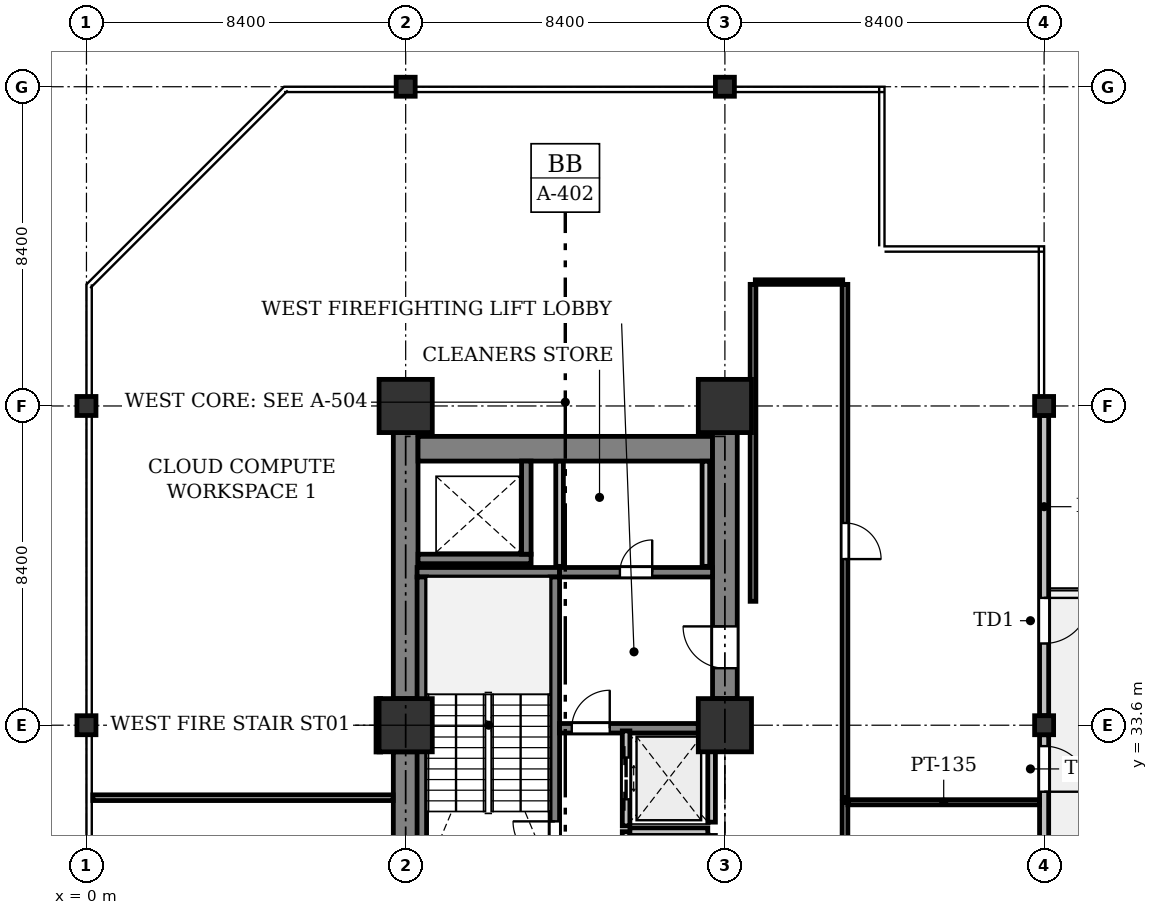
"""IFC4 building model, lengths in metres.
Left out: names, types, materials, properties, quantities, classifications, styles, units other than length and angle.
Written with IfcOpenShell. Run it as: python <this file> out.ifc"""

import sys

from ifc_helpers import new_model, si_unit, direction, frame, frame_2d, origin, origin_2d, place, context, subcontext, project, spatial, rectangle, i_section, extrude, element, fill, save


model = new_model("IFC4")
c1 = context("Model", 3, precision=1e-05, world=origin(), true_north=direction((0.0, 1.0)))
c2 = subcontext(c1, "Body", "Model", "MODEL_VIEW")
j1 = project(units=[si_unit("LENGTHUNIT", "METRE"), si_unit("PLANEANGLEUNIT", "RADIAN")], contexts=[c1])
p1 = place(None, origin())
s1 = spatial("IfcSite", under=j1, at=p1, CompositionType="ELEMENT")
p2 = place(p1, origin())
s2 = spatial("IfcBuilding", under=s1, at=p2, CompositionType="ELEMENT")
p3 = place(p2, frame((0.0, 0.0, 24.8)))
s3 = spatial("IfcBuildingStorey", under=s2, at=p3, CompositionType="ELEMENT", Elevation=24.8)
for number, where, z_axis, x_axis in (
    (1, (0.0, 33.6, 0.0), (0.0, 0.0, 1.0), (1.0, 0.0, 0.0)),
    (2, (0.0, 42.0, 0.0), (0.0, 0.0, 1.0), (1.0, 0.0, 0.0)),
):
    element("IfcColumn", number, at=place(p3, frame(where, z_axis=z_axis, x_axis=x_axis)), inside=s3, PredefinedType="COLUMN", context=c2, shape_type="SweptSolid", body=[
        extrude(i_section(OverallWidth=0.5, OverallDepth=0.5, WebThickness=0.028, FlangeThickness=0.04, at=origin_2d()), origin(), (0.0, 0.0, 1.0), 4.2),
    ])
for number, where, z_axis, x_axis in (
    (3, (8.4, 33.6, 0.0), (0.0, 0.0, 1.0), (1.0, 0.0, 0.0)),
    (4, (8.4, 42.0, 0.0), (0.0, 0.0, 1.0), (1.0, 0.0, 0.0)),
):
    element("IfcColumn", number, at=place(p3, frame(where, z_axis=z_axis, x_axis=x_axis)), inside=s3, PredefinedType="COLUMN", context=c2, shape_type="SweptSolid", body=[
        extrude(rectangle(XDim=1.4, YDim=1.4, at=origin_2d()), origin(), (0.0, 0.0, 1.0), 4.2),
    ])
p4 = place(p3, frame((8.4, 50.4, 0.0), z_axis=(0.0, 0.0, 1.0), x_axis=(1.0, 0.0, 0.0)))
e5 = element("IfcColumn", 5, at=p4, inside=s3, PredefinedType="COLUMN", context=c2, shape_type="SweptSolid", body=[
    extrude(i_section(OverallWidth=0.5, OverallDepth=0.5, WebThickness=0.028, FlangeThickness=0.04, at=origin_2d()), origin(), (0.0, 0.0, 1.0), 4.2),
])
for number, where, z_axis, x_axis in (
    (6, (16.8, 33.6, 0.0), (0.0, 0.0, 1.0), (1.0, 0.0, 0.0)),
    (7, (16.8, 42.0, 0.0), (0.0, 0.0, 1.0), (1.0, 0.0, 0.0)),
):
    element("IfcColumn", number, at=place(p3, frame(where, z_axis=z_axis, x_axis=x_axis)), inside=s3, PredefinedType="COLUMN", context=c2, shape_type="SweptSolid", body=[
        extrude(rectangle(XDim=1.4, YDim=1.4, at=origin_2d()), origin(), (0.0, 0.0, 1.0), 4.2),
    ])
for number, where, z_axis, x_axis in (
    (8, (16.8, 50.4, 0.0), (0.0, 0.0, 1.0), (1.0, 0.0, 0.0)),
    (9, (25.2, 33.6, 0.0), (0.0, 0.0, 1.0), (1.0, 0.0, 0.0)),
    (10, (25.2, 42.0, 0.0), (0.0, 0.0, 1.0), (1.0, 0.0, 0.0)),
):
    element("IfcColumn", number, at=place(p3, frame(where, z_axis=z_axis, x_axis=x_axis)), inside=s3, PredefinedType="COLUMN", context=c2, shape_type="SweptSolid", body=[
        extrude(i_section(OverallWidth=0.5, OverallDepth=0.5, WebThickness=0.028, FlangeThickness=0.04, at=origin_2d()), origin(), (0.0, 0.0, 1.0), 4.2),
    ])
p5 = place(p3, frame((25.2, 41.75, 0.0), z_axis=(0.0, 0.0, 1.0), x_axis=(0.0, -1.0, 0.0)))
e11 = element("IfcWall", 11, at=p5, inside=s3, PredefinedType="STANDARD", context=c2, shape_type="SweptSolid", body=[
    extrude(rectangle(XDim=7.9, YDim=0.24, at=frame_2d((3.95, 0.0))), origin(), (0.0, 0.0, 1.0), 3.471),
])
p6 = place(p5, frame((4.8, 0.0, 0.0)))
e12 = element("IfcOpeningElement", 12, at=p6, cuts=e11, PredefinedType="OPENING", context=c2, shape_type="SweptSolid", body=[
    extrude(rectangle(XDim=1.2, YDim=2.2, at=frame_2d((0.6, 1.1))), frame((0.0, 0.13, 0.0), z_axis=(0.0, -1.0, 0.0), x_axis=(1.0, 0.0, 0.0)), (0.0, 0.0, 1.0), 0.26),
])
p7 = place(p3, frame((25.2, 33.35, 0.0), z_axis=(0.0, 0.0, 1.0), x_axis=(0.0, -1.0, 0.0)))
e13 = element("IfcWall", 13, at=p7, inside=s3, PredefinedType="STANDARD", context=c2, shape_type="SweptSolid", body=[
    extrude(rectangle(XDim=7.9, YDim=0.24, at=frame_2d((3.95, 0.0))), origin(), (0.0, 0.0, 1.0), 3.471),
])
p8 = place(p7, frame((0.3, 0.0, 0.0)))
e14 = element("IfcOpeningElement", 14, at=p8, cuts=e13, PredefinedType="OPENING", context=c2, shape_type="SweptSolid", body=[
    extrude(rectangle(XDim=1.2, YDim=2.2, at=frame_2d((0.6, 1.1))), frame((0.0, 0.13, 0.0), z_axis=(0.0, -1.0, 0.0), x_axis=(1.0, 0.0, 0.0)), (0.0, 0.0, 1.0), 0.26),
])
p9 = place(p7, frame((3.894, 0.0, 0.9)))
e15 = element("IfcOpeningElement", 15, at=p9, cuts=e13, PredefinedType="OPENING", context=c2, shape_type="SweptSolid", body=[
    extrude(rectangle(XDim=1.8, YDim=1.6, at=frame_2d((0.9, 0.8))), frame((0.0, 0.13, 0.0), z_axis=(0.0, -1.0, 0.0), x_axis=(1.0, 0.0, 0.0)), (0.0, 0.0, 1.0), 0.26),
])
for number, where, z_axis, x_axis in (
    (16, (8.4, 25.9, 0.0), (0.0, 0.0, 1.0), (0.0, 1.0, 0.0)),
    (17, (8.4, 34.3, 0.0), (0.0, 0.0, 1.0), (0.0, 1.0, 0.0)),
):
    element("IfcWall", number, at=place(p3, frame(where, z_axis=z_axis, x_axis=x_axis)), inside=s3, PredefinedType="SHEAR", context=c2, shape_type="SweptSolid", body=[
        extrude(rectangle(XDim=7.0, YDim=0.65, at=frame_2d((3.5, 0.0))), origin(), (0.0, 0.0, 1.0), 3.925),
    ])
p10 = place(p3, frame((8.725, 40.875, 0.0), z_axis=(0.0, 0.0, 1.0), x_axis=(1.0, 0.0, 0.0)))
e18 = element("IfcWall", 18, at=p10, inside=s3, PredefinedType="SHEAR", context=c2, shape_type="SweptSolid", body=[
    extrude(rectangle(XDim=7.75, YDim=0.65, at=frame_2d((3.875, 0.0))), origin(), (0.0, 0.0, 1.0), 3.925),
])
p11 = place(p3, frame((16.8, 34.3, 0.0), z_axis=(0.0, 0.0, 1.0), x_axis=(0.0, 1.0, 0.0)))
e19 = element("IfcWall", 19, at=p11, inside=s3, PredefinedType="SHEAR", context=c2, shape_type="SweptSolid", body=[
    extrude(rectangle(XDim=7.0, YDim=0.65, at=frame_2d((3.5, 0.0))), origin(), (0.0, 0.0, 1.0), 3.925),
])
p12 = place(p11, frame((0.8, 0.0, 0.0)))
e20 = element("IfcOpeningElement", 20, at=p12, cuts=e19, PredefinedType="OPENING", context=c2, shape_type="SweptSolid", body=[
    extrude(rectangle(XDim=1.1, YDim=2.15, at=frame_2d((0.55, 1.075))), frame((0.0, 0.335, 0.0), z_axis=(0.0, -1.0, 0.0), x_axis=(1.0, 0.0, 0.0)), (0.0, 0.0, 1.0), 0.67),
])
p13 = place(p3, frame((12.45, 37.625, 0.0), z_axis=(0.0, 0.0, 1.0), x_axis=(-1.0, 0.0, 0.0)))
e21 = element("IfcWall", 21, at=p13, inside=s3, PredefinedType="SHEAR", context=c2, shape_type="SweptSolid", body=[
    extrude(rectangle(XDim=3.75, YDim=0.25, at=frame_2d((1.875, 0.0))), origin(), (0.0, 0.0, 1.0), 3.925),
])
p14 = place(p3, frame((12.325, 29.75, 0.0), z_axis=(0.0, 0.0, 1.0), x_axis=(0.0, 1.0, 0.0)))
e22 = element("IfcWall", 22, at=p14, inside=s3, PredefinedType="SHEAR", context=c2, shape_type="SweptSolid", body=[
    extrude(rectangle(XDim=7.75, YDim=0.25, at=frame_2d((3.875, 0.0))), origin(), (0.0, 0.0, 1.0), 3.925),
])
p15 = place(p14, frame((0.22, 0.0, 0.0)))
e23 = element("IfcOpeningElement", 23, at=p15, cuts=e22, PredefinedType="OPENING", context=c2, shape_type="SweptSolid", body=[
    extrude(rectangle(XDim=1.1, YDim=2.15, at=frame_2d((0.55, 1.075))), frame((0.0, 0.135, 0.0), z_axis=(0.0, -1.0, 0.0), x_axis=(1.0, 0.0, 0.0)), (0.0, 0.0, 1.0), 0.27),
])
p16 = place(p3, frame((8.825, 29.75, 0.0), z_axis=(0.0, 0.0, 1.0), x_axis=(0.0, 1.0, 0.0)))
e24 = element("IfcWall", 24, at=p16, inside=s3, PredefinedType="SHEAR", context=c2, shape_type="SweptSolid", body=[
    extrude(rectangle(XDim=7.75, YDim=0.25, at=frame_2d((3.875, 0.0))), origin(), (0.0, 0.0, 1.0), 3.925),
])
p17 = place(p3, frame((8.725, 37.975, 0.0), z_axis=(0.0, 0.0, 1.0), x_axis=(1.0, 0.0, 0.0)))
e25 = element("IfcWall", 25, at=p17, inside=s3, PredefinedType="SHEAR", context=c2, shape_type="SweptSolid", body=[
    extrude(rectangle(XDim=2.975, YDim=0.25, at=frame_2d((1.487, 0.0))), origin(), (0.0, 0.0, 1.0), 3.925),
])
p18 = place(p3, frame((11.575, 38.1, 0.0), z_axis=(0.0, 0.0, 1.0), x_axis=(0.0, 1.0, 0.0)))
e26 = element("IfcWall", 26, at=p18, inside=s3, PredefinedType="SHEAR", context=c2, shape_type="SweptSolid", body=[
    extrude(rectangle(XDim=2.45, YDim=0.25, at=frame_2d((1.225, 0.0))), origin(), (0.0, 0.0, 1.0), 3.925),
])
p19 = place(p3, frame((12.45, 33.52, 0.0), z_axis=(0.0, 0.0, 1.0), x_axis=(1.0, 0.0, 0.0)))
e27 = element("IfcWall", 27, at=p19, inside=s3, PredefinedType="SHEAR", context=c2, shape_type="SweptSolid", body=[
    extrude(rectangle(XDim=3.65, YDim=0.25, at=frame_2d((1.825, 0.0))), origin(), (0.0, 0.0, 1.0), 3.925),
])
p20 = place(p19, frame((0.32, 0.0, 0.0)))
e28 = element("IfcOpeningElement", 28, at=p20, cuts=e27, PredefinedType="OPENING", context=c2, shape_type="SweptSolid", body=[
    extrude(rectangle(XDim=1.0, YDim=2.15, at=frame_2d((0.5, 1.075))), frame((0.0, 0.135, 0.0), z_axis=(0.0, -1.0, 0.0), x_axis=(1.0, 0.0, 0.0)), (0.0, 0.0, 1.0), 0.27),
])
p21 = place(p3, frame((12.45, 37.625, 0.0), z_axis=(0.0, 0.0, 1.0), x_axis=(1.0, 0.0, 0.0)))
e29 = element("IfcWall", 29, at=p21, inside=s3, PredefinedType="SHEAR", context=c2, shape_type="SweptSolid", body=[
    extrude(rectangle(XDim=4.025, YDim=0.25, at=frame_2d((2.013, 0.0))), origin(), (0.0, 0.0, 1.0), 3.925),
])
p22 = place(p21, frame((1.587, 0.0, 0.0)))
e30 = element("IfcOpeningElement", 30, at=p22, cuts=e29, PredefinedType="OPENING", context=c2, shape_type="SweptSolid", body=[
    extrude(rectangle(XDim=0.85, YDim=2.15, at=frame_2d((0.425, 1.075))), frame((0.0, 0.135, 0.0), z_axis=(0.0, -1.0, 0.0), x_axis=(1.0, 0.0, 0.0)), (0.0, 0.0, 1.0), 0.27),
])
p23 = place(p3, frame((14.2, 28.3, 0.0), z_axis=(0.0, 0.0, 1.0), x_axis=(0.0, 1.0, 0.0)))
e31 = element("IfcWall", 31, at=p23, inside=s3, PredefinedType="PARTITIONING", context=c2, shape_type="SweptSolid", body=[
    extrude(rectangle(XDim=2.5, YDim=0.2, at=frame_2d((1.25, 0.0))), origin(), (0.0, 0.0, 1.0), 3.925),
])
p24 = place(p23, frame((0.7, 0.0, 0.0)))
e32 = element("IfcOpeningElement", 32, at=p24, cuts=e31, PredefinedType="OPENING", context=c2, shape_type="SweptSolid", body=[
    extrude(rectangle(XDim=1.1, YDim=2.2, at=frame_2d((0.55, 1.1))), frame((0.0, 0.11, 0.0), z_axis=(0.0, -1.0, 0.0), x_axis=(1.0, 0.0, 0.0)), (0.0, 0.0, 1.0), 0.22),
])
p25 = place(p3, frame((16.45, 28.4, 0.0), z_axis=(0.0, 0.0, 1.0), x_axis=(0.0, 1.0, 0.0)))
e33 = element("IfcWall", 33, at=p25, inside=s3, PredefinedType="PARTITIONING", context=c2, shape_type="SweptSolid", body=[
    extrude(rectangle(XDim=2.3, YDim=0.2, at=frame_2d((1.15, 0.0))), origin(), (0.0, 0.0, 1.0), 3.925),
])
p26 = place(p3, frame((14.3, 30.8, 0.0), z_axis=(0.0, 0.0, 1.0), x_axis=(1.0, 0.0, 0.0)))
e34 = element("IfcWall", 34, at=p26, inside=s3, PredefinedType="PARTITIONING", context=c2, shape_type="SweptSolid", body=[
    extrude(rectangle(XDim=2.05, YDim=0.2, at=frame_2d((1.025, 0.0))), origin(), (0.0, 0.0, 1.0), 3.925),
])
p27 = place(p3, frame((14.2, 30.95, 0.0), z_axis=(0.0, 0.0, 1.0), x_axis=(0.0, 1.0, 0.0)))
e35 = element("IfcWall", 35, at=p27, inside=s3, PredefinedType="PARTITIONING", context=c2, shape_type="SweptSolid", body=[
    extrude(rectangle(XDim=2.5, YDim=0.2, at=frame_2d((1.25, 0.0))), origin(), (0.0, 0.0, 1.0), 3.925),
])
p28 = place(p27, frame((0.7, 0.0, 0.0)))
e36 = element("IfcOpeningElement", 36, at=p28, cuts=e35, PredefinedType="OPENING", context=c2, shape_type="SweptSolid", body=[
    extrude(rectangle(XDim=1.1, YDim=2.2, at=frame_2d((0.55, 1.1))), frame((0.0, 0.11, 0.0), z_axis=(0.0, -1.0, 0.0), x_axis=(1.0, 0.0, 0.0)), (0.0, 0.0, 1.0), 0.22),
])
p29 = place(p3, frame((16.45, 31.05, 0.0), z_axis=(0.0, 0.0, 1.0), x_axis=(0.0, 1.0, 0.0)))
e37 = element("IfcWall", 37, at=p29, inside=s3, PredefinedType="PARTITIONING", context=c2, shape_type="SweptSolid", body=[
    extrude(rectangle(XDim=2.3, YDim=0.2, at=frame_2d((1.15, 0.0))), origin(), (0.0, 0.0, 1.0), 3.925),
])
for number, where, z_axis, x_axis in (
    (38, (16.3, 37.78, 0.0), (0.0, 0.0, 1.0), (0.0, 1.0, 0.0)),
    (39, (12.45, 40.546, 0.0), (0.0, 0.0, 1.0), (0.0, -1.0, 0.0)),
):
    element("IfcWall", number, at=place(p3, frame(where, z_axis=z_axis, x_axis=x_axis)), inside=s3, PredefinedType="PARTITIONING", context=c2, shape_type="SweptSolid", body=[
        extrude(rectangle(XDim=2.766, YDim=0.2, at=frame_2d((1.383, 0.0))), origin(), (0.0, 0.0, 1.0), 2.825),
    ])
p30 = place(p3, frame((19.96, 31.573, 0.0), z_axis=(0.0, 0.0, 1.0), x_axis=(0.0, -1.0, 0.0)))
e40 = element("IfcWall", 40, at=p30, inside=s3, PredefinedType="PARTITIONING", context=c2, shape_type="SweptSolid", body=[
    extrude(rectangle(XDim=11.613, YDim=0.15, at=frame_2d((5.806, 0.0))), origin(), (0.0, 0.0, 1.0), 3.313),
])
p31 = place(p3, frame((25.076, 31.573, 0.0), z_axis=(0.0, 0.0, 1.0), x_axis=(-1.0, 0.0, 0.0)))
e41 = element("IfcWall", 41, at=p31, inside=s3, PredefinedType="PARTITIONING", context=c2, shape_type="SweptSolid", body=[
    extrude(rectangle(XDim=5.037, YDim=0.135, at=frame_2d((2.519, 0.0))), origin(), (0.0, 0.0, 1.0), 3.566),
])
p32 = place(p3, frame((19.96, 45.2, 0.0), z_axis=(0.0, 0.0, 1.0), x_axis=(0.0, -1.0, 0.0)))
e42 = element("IfcWall", 42, at=p32, inside=s3, PredefinedType="PARTITIONING", context=c2, shape_type="SweptSolid", body=[
    extrude(rectangle(XDim=13.507, YDim=0.15, at=frame_2d((6.753, 0.0))), origin(), (0.0, 0.0, 1.0), 3.313),
])
p33 = place(p32, frame((6.279, 0.0, 0.0)))
e43 = element("IfcOpeningElement", 43, at=p33, cuts=e42, PredefinedType="OPENING", context=c2, shape_type="SweptSolid", body=[
    extrude(rectangle(XDim=0.95, YDim=2.15, at=frame_2d((0.475, 1.075))), frame((0.0, 0.085, 0.0), z_axis=(0.0, -1.0, 0.0), x_axis=(1.0, 0.0, 0.0)), (0.0, 0.0, 1.0), 0.17),
])
p34 = place(p3, frame((0.169, 31.693, 0.0), z_axis=(0.0, 0.0, 1.0), x_axis=(1.0, 0.0, 0.0)))
e44 = element("IfcWall", 44, at=p34, inside=s3, PredefinedType="PARTITIONING", context=c2, shape_type="SweptSolid", body=[
    extrude(rectangle(XDim=7.902, YDim=0.15, at=frame_2d((3.951, 0.0))), origin(), (0.0, 0.0, 1.0), 3.566),
])
p35 = place(p3, frame((7.68, 32.896, 0.0), z_axis=(0.0, 0.0, 1.0), x_axis=(-0.000347765585, 0.99999993953, 0.0)))
e45 = element("IfcWall", 45, at=p35, inside=s3, PredefinedType="PARTITIONING", context=c2, shape_type="SweptSolid", body=[
    extrude(rectangle(XDim=1.404, YDim=0.12, at=frame_2d((0.702, 0.0))), origin(), (0.0, 0.0, 1.0), 3.313),
])
p36 = place(p3, frame((17.54, 36.86, 0.0), z_axis=(0.0, 0.0, 1.0), x_axis=(0.0, 1.0, 0.0)))
e46 = element("IfcWall", 46, at=p36, inside=s3, PredefinedType="PARTITIONING", context=c2, shape_type="SweptSolid", body=[
    extrude(rectangle(XDim=8.34, YDim=0.15, at=frame_2d((4.17, 0.0))), origin(), (0.0, 0.0, 1.0), 3.313),
])
p37 = place(p3, frame((17.6, 45.26, 0.0), z_axis=(0.0, 0.0, 1.0), x_axis=(1.0, 0.0, 0.0)))
e47 = element("IfcWall", 47, at=p37, inside=s3, PredefinedType="PARTITIONING", context=c2, shape_type="SweptSolid", body=[
    extrude(rectangle(XDim=2.3, YDim=0.12, at=frame_2d((1.15, 0.0))), origin(), (0.0, 0.0, 1.0), 3.925),
])
p38 = place(p6, origin())
e48 = element("IfcDoor", 48, at=p38, inside=s3, OperationType="SINGLE_SWING_LEFT", PredefinedType="DOOR", context=c2, shape_type="SweptSolid", body=[
    extrude(rectangle(XDim=1.2, YDim=2.2, at=frame_2d((0.6, 1.1))), frame((0.0, 0.025, 0.0), z_axis=(0.0, -1.0, 0.0), x_axis=(1.0, 0.0, 0.0)), (0.0, 0.0, 1.0), 0.05),
])
fill(e12, e48)
p39 = place(p8, origin())
e49 = element("IfcDoor", 49, at=p39, inside=s3, OperationType="SINGLE_SWING_RIGHT", PredefinedType="DOOR", context=c2, shape_type="SweptSolid", body=[
    extrude(rectangle(XDim=1.2, YDim=2.2, at=frame_2d((0.6, 1.1))), frame((0.0, 0.025, 0.0), z_axis=(0.0, -1.0, 0.0), x_axis=(1.0, 0.0, 0.0)), (0.0, 0.0, 1.0), 0.05),
])
fill(e14, e49)
p40 = place(p12, origin())
e50 = element("IfcDoor", 50, at=p40, inside=s3, OperationType="SINGLE_SWING_RIGHT", PredefinedType="DOOR", context=c2, shape_type="SweptSolid", body=[
    extrude(rectangle(XDim=1.1, YDim=2.15, at=frame_2d((0.55, 1.075))), frame((0.0, 0.025, 0.0), z_axis=(0.0, -1.0, 0.0), x_axis=(1.0, 0.0, 0.0)), (0.0, 0.0, 1.0), 0.05),
])
fill(e20, e50)
p41 = place(p15, origin())
e51 = element("IfcDoor", 51, at=p41, inside=s3, OperationType="SINGLE_SWING_RIGHT", PredefinedType="DOOR", context=c2, shape_type="SweptSolid", body=[
    extrude(rectangle(XDim=1.1, YDim=2.15, at=frame_2d((0.55, 1.075))), frame((0.0, 0.025, 0.0), z_axis=(0.0, -1.0, 0.0), x_axis=(1.0, 0.0, 0.0)), (0.0, 0.0, 1.0), 0.05),
])
fill(e23, e51)
p42 = place(p20, origin())
e52 = element("IfcDoor", 52, at=p42, inside=s3, OperationType="SINGLE_SWING_RIGHT", PredefinedType="DOOR", context=c2, shape_type="SweptSolid", body=[
    extrude(rectangle(XDim=1.0, YDim=2.15, at=frame_2d((0.5, 1.075))), frame((0.0, 0.025, 0.0), z_axis=(0.0, -1.0, 0.0), x_axis=(1.0, 0.0, 0.0)), (0.0, 0.0, 1.0), 0.05),
])
fill(e28, e52)
p43 = place(p28, origin())
e53 = element("IfcDoor", 53, at=p43, inside=s3, OperationType="DOUBLE_DOOR_SLIDING", PredefinedType="DOOR", context=c2, shape_type="SweptSolid", body=[
    extrude(rectangle(XDim=1.1, YDim=2.2, at=frame_2d((0.55, 1.1))), frame((0.0, 0.025, 0.0), z_axis=(0.0, -1.0, 0.0), x_axis=(1.0, 0.0, 0.0)), (0.0, 0.0, 1.0), 0.05),
])
fill(e36, e53)
p44 = place(p22, origin())
e54 = element("IfcDoor", 54, at=p44, inside=s3, OperationType="SINGLE_SWING_RIGHT", PredefinedType="DOOR", context=c2, shape_type="SweptSolid", body=[
    extrude(rectangle(XDim=0.85, YDim=2.15, at=frame_2d((0.425, 1.075))), frame((0.0, 0.025, 0.0), z_axis=(0.0, -1.0, 0.0), x_axis=(1.0, 0.0, 0.0)), (0.0, 0.0, 1.0), 0.05),
])
fill(e30, e54)
p45 = place(p33, origin())
e55 = element("IfcDoor", 55, at=p45, inside=s3, OperationType="SINGLE_SWING_RIGHT", PredefinedType="DOOR", context=c2, shape_type="SweptSolid", body=[
    extrude(rectangle(XDim=0.95, YDim=2.15, at=frame_2d((0.475, 1.075))), frame((0.0, 0.025, 0.0), z_axis=(0.0, -1.0, 0.0), x_axis=(1.0, 0.0, 0.0)), (0.0, 0.0, 1.0), 0.05),
])
fill(e43, e55)
save(model, sys.argv[1])
